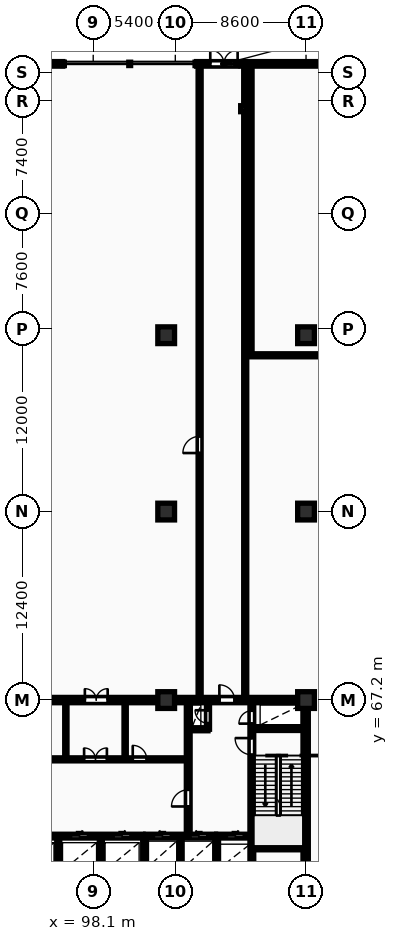
"""IFC4 building model, lengths in metres.
Left out: names, types, materials, properties, quantities, classifications, styles, units other than length and angle.
Written with IfcOpenShell. Run it as: python <this file> out.ifc"""

import sys

from ifc_helpers import new_model, si_unit, direction, frame, frame_2d, origin, origin_2d, place, context, subcontext, project, spatial, rectangle, i_section, extrude, element, fill, save


model = new_model("IFC4")
c1 = context("Model", 3, precision=1e-05, world=origin(), true_north=direction((0.0, 1.0)))
c2 = subcontext(c1, "Body", "Model", "MODEL_VIEW")
j1 = project(units=[si_unit("LENGTHUNIT", "METRE"), si_unit("PLANEANGLEUNIT", "RADIAN")], contexts=[c1])
p1 = place(None, origin())
s1 = spatial("IfcSite", under=j1, at=p1, CompositionType="ELEMENT")
p2 = place(p1, origin())
s2 = spatial("IfcBuilding", under=s1, at=p2, CompositionType="ELEMENT")
p3 = place(p2, origin())
s3 = spatial("IfcBuildingStorey", under=s2, at=p3, CompositionType="ELEMENT", Elevation=0.0)
for number, where, z_axis, x_axis in (
    (1, (102.9, 67.2, 0.0), (0.0, 0.0, 1.0), (1.0, 0.0, 0.0)),
    (2, (102.9, 79.6, 0.0), (0.0, 0.0, 1.0), (1.0, 0.0, 0.0)),
    (3, (102.9, 91.2, 0.0), (0.0, 0.0, 1.0), (1.0, 0.0, 0.0)),
    (4, (112.1, 67.2, 0.0), (0.0, 0.0, 1.0), (1.0, 0.0, 0.0)),
    (5, (112.1, 79.6, 0.0), (0.0, 0.0, 1.0), (1.0, 0.0, 0.0)),
    (6, (112.1, 91.2, 0.0), (0.0, 0.0, 1.0), (1.0, 0.0, 0.0)),
):
    element("IfcColumn", number, at=place(p3, frame(where, z_axis=z_axis, x_axis=x_axis)), inside=s3, PredefinedType="COLUMN", context=c2, shape_type="SweptSolid", body=[
        extrude(rectangle(XDim=1.1, YDim=1.1, at=origin_2d()), origin(), (0.0, 0.0, 1.0), 5.4),
    ])
p4 = place(p3, frame((108.0, 106.1, 0.0), z_axis=(0.0, 0.0, 1.0), x_axis=(1.0, 0.0, 0.0)))
e7 = element("IfcColumn", 7, at=p4, inside=s3, PredefinedType="COLUMN", context=c2, shape_type="SweptSolid", body=[
    extrude(i_section(OverallWidth=0.399, OverallDepth=0.394, WebThickness=0.023, FlangeThickness=0.037, FilletRadius=0.015, at=origin_2d()), origin(), (0.0, 0.0, 1.0), 5.4),
])
p5 = place(p3, frame((153.5, 109.05, 0.0), z_axis=(0.0, 0.0, 1.0), x_axis=(-1.0, 0.0, 0.0)))
e8 = element("IfcWall", 8, at=p5, inside=s3, PredefinedType="STANDARD", context=c2, shape_type="SweptSolid", body=[
    extrude(rectangle(XDim=48.6, YDim=0.3, at=frame_2d((24.3, 0.0))), origin(), (0.0, 0.0, 1.0), 5.1),
])
p6 = place(p5, frame((45.9, 0.0, 0.0)))
e9 = element("IfcOpeningElement", 9, at=p6, cuts=e8, PredefinedType="OPENING", context=c2, shape_type="SweptSolid", body=[
    extrude(rectangle(XDim=1.8, YDim=2.2, at=frame_2d((0.9, 1.1))), frame((0.0, 0.16, 0.0), z_axis=(0.0, -1.0, 0.0), x_axis=(1.0, 0.0, 0.0)), (0.0, 0.0, 1.0), 0.32),
])
p7 = place(p5, frame((12.0, 0.0, 0.9)))
e10 = element("IfcOpeningElement", 10, at=p7, cuts=e8, PredefinedType="OPENING", context=c2, shape_type="SweptSolid", body=[
    extrude(rectangle(XDim=3.0, YDim=2.6, at=frame_2d((1.5, 1.3))), frame((0.0, 0.16, 0.0), z_axis=(0.0, -1.0, 0.0), x_axis=(1.0, 0.0, 0.0)), (0.0, 0.0, 1.0), 0.32),
])
p8 = place(p3, frame((96.1, 109.05, 0.0), z_axis=(0.0, 0.0, 1.0), x_axis=(-1.0, 0.0, 0.0)))
e11 = element("IfcWall", 11, at=p8, inside=s3, PredefinedType="STANDARD", context=c2, shape_type="SweptSolid", body=[
    extrude(rectangle(XDim=4.0, YDim=0.3, at=frame_2d((2.0, 0.0))), origin(), (0.0, 0.0, 1.0), 5.1),
])
p9 = place(p8, frame((1.0, 0.0, 0.0)))
e12 = element("IfcOpeningElement", 12, at=p9, cuts=e11, PredefinedType="OPENING", context=c2, shape_type="SweptSolid", body=[
    extrude(rectangle(XDim=2.0, YDim=2.6, at=frame_2d((1.0, 1.3))), frame((0.0, 0.16, 0.0), z_axis=(0.0, -1.0, 0.0), x_axis=(1.0, 0.0, 0.0)), (0.0, 0.0, 1.0), 0.32),
])
p10 = place(p3, frame((112.075, 55.375, 0.0), z_axis=(0.0, 0.0, 1.0), x_axis=(0.0, 1.0, 0.0)))
e13 = element("IfcWall", 13, at=p10, inside=s3, PredefinedType="SHEAR", context=c2, shape_type="SweptSolid", body=[
    extrude(rectangle(XDim=11.65, YDim=0.35, at=frame_2d((5.825, 0.0))), origin(), (0.0, 0.0, 1.0), 5.4),
])
p11 = place(p3, frame((75.95, 67.2, 0.0), z_axis=(0.0, 0.0, 1.0), x_axis=(1.0, 0.0, 0.0)))
e14 = element("IfcWall", 14, at=p11, inside=s3, PredefinedType="SHEAR", context=c2, shape_type="SweptSolid", body=[
    extrude(rectangle(XDim=36.3, YDim=0.35, at=frame_2d((18.15, 0.0))), origin(), (0.0, 0.0, 1.0), 5.4),
])
p12 = place(p11, frame((5.25, 0.0, 0.0)))
e15 = element("IfcOpeningElement", 15, at=p12, cuts=e14, PredefinedType="OPENING", context=c2, shape_type="SweptSolid", body=[
    extrude(rectangle(XDim=1.0, YDim=2.15, at=frame_2d((0.5, 1.075))), frame((0.0, 0.185, 0.0), z_axis=(0.0, -1.0, 0.0), x_axis=(1.0, 0.0, 0.0)), (0.0, 0.0, 1.0), 0.37),
])
p13 = place(p11, frame((21.6, 0.0, 0.0)))
e16 = element("IfcOpeningElement", 16, at=p13, cuts=e14, PredefinedType="OPENING", context=c2, shape_type="SweptSolid", body=[
    extrude(rectangle(XDim=1.5, YDim=2.2, at=frame_2d((0.75, 1.1))), frame((0.0, 0.185, 0.0), z_axis=(0.0, -1.0, 0.0), x_axis=(1.0, 0.0, 0.0)), (0.0, 0.0, 1.0), 0.37),
])
p14 = place(p11, frame((30.45, 0.0, 0.0)))
e17 = element("IfcOpeningElement", 17, at=p14, cuts=e14, PredefinedType="OPENING", context=c2, shape_type="SweptSolid", body=[
    extrude(rectangle(XDim=1.0, YDim=2.15, at=frame_2d((0.5, 1.075))), frame((0.0, 0.185, 0.0), z_axis=(0.0, -1.0, 0.0), x_axis=(1.0, 0.0, 0.0)), (0.0, 0.0, 1.0), 0.37),
])
for number, where, z_axis, x_axis in (
    (18, (95.8, 55.4, 0.0), (0.0, 0.0, 1.0), (0.0, 1.0, 0.0)),
    (19, (98.6, 55.4, 0.0), (0.0, 0.0, 1.0), (0.0, 1.0, 0.0)),
):
    element("IfcWall", number, at=place(p3, frame(where, z_axis=z_axis, x_axis=x_axis)), inside=s3, PredefinedType="PARTITIONING", context=c2, shape_type="SweptSolid", body=[
        extrude(rectangle(XDim=2.72, YDim=0.2, at=frame_2d((1.36, 0.0))), origin(), (0.0, 0.0, 1.0), 5.1),
    ])
p15 = place(p3, frame((93.02, 58.25, 0.0), z_axis=(0.0, 0.0, 1.0), x_axis=(1.0, 0.0, 0.0)))
e20 = element("IfcWall", 20, at=p15, inside=s3, PredefinedType="SHEAR", context=c2, shape_type="SweptSolid", body=[
    extrude(rectangle(XDim=8.36, YDim=0.25, at=frame_2d((4.18, 0.0))), origin(), (0.0, 0.0, 1.0), 5.4),
])
p16 = place(p15, frame((0.82, 0.0, 0.0)))
e21 = element("IfcOpeningElement", 21, at=p16, cuts=e20, PredefinedType="OPENING", context=c2, shape_type="SweptSolid", body=[
    extrude(rectangle(XDim=1.12, YDim=2.12, at=frame_2d((0.56, 1.06))), frame((0.0, 0.135, 0.0), z_axis=(0.0, -1.0, 0.0), x_axis=(1.0, 0.0, 0.0)), (0.0, 0.0, 1.0), 0.27),
])
p17 = place(p15, frame((3.62, 0.0, 0.0)))
e22 = element("IfcOpeningElement", 22, at=p17, cuts=e20, PredefinedType="OPENING", context=c2, shape_type="SweptSolid", body=[
    extrude(rectangle(XDim=1.12, YDim=2.12, at=frame_2d((0.56, 1.06))), frame((0.0, 0.135, 0.0), z_axis=(0.0, -1.0, 0.0), x_axis=(1.0, 0.0, 0.0)), (0.0, 0.0, 1.0), 0.27),
])
p18 = place(p15, frame((6.42, 0.0, 0.0)))
e23 = element("IfcOpeningElement", 23, at=p18, cuts=e20, PredefinedType="OPENING", context=c2, shape_type="SweptSolid", body=[
    extrude(rectangle(XDim=1.12, YDim=2.12, at=frame_2d((0.56, 1.06))), frame((0.0, 0.135, 0.0), z_axis=(0.0, -1.0, 0.0), x_axis=(1.0, 0.0, 0.0)), (0.0, 0.0, 1.0), 0.27),
])
p19 = place(p3, frame((101.48, 55.4, 0.0), z_axis=(0.0, 0.0, 1.0), x_axis=(0.0, 1.0, 0.0)))
e24 = element("IfcWall", 24, at=p19, inside=s3, PredefinedType="SHEAR", context=c2, shape_type="SweptSolid", body=[
    extrude(rectangle(XDim=2.85, YDim=0.25, at=frame_2d((1.425, 0.0))), origin(), (0.0, 0.0, 1.0), 5.4),
])
p20 = place(p3, frame((103.85, 55.4, 0.0), z_axis=(0.0, 0.0, 1.0), x_axis=(0.0, 1.0, 0.0)))
e25 = element("IfcWall", 25, at=p20, inside=s3, PredefinedType="PARTITIONING", context=c2, shape_type="SweptSolid", body=[
    extrude(rectangle(XDim=2.72, YDim=0.2, at=frame_2d((1.36, 0.0))), origin(), (0.0, 0.0, 1.0), 5.1),
])
p21 = place(p3, frame((101.55, 58.25, 0.0), z_axis=(0.0, 0.0, 1.0), x_axis=(1.0, 0.0, 0.0)))
e26 = element("IfcWall", 26, at=p21, inside=s3, PredefinedType="SHEAR", context=c2, shape_type="SweptSolid", body=[
    extrude(rectangle(XDim=4.6, YDim=0.25, at=frame_2d((2.3, 0.0))), origin(), (0.0, 0.0, 1.0), 5.4),
])
p22 = place(p21, frame((0.54, 0.0, 0.0)))
e27 = element("IfcOpeningElement", 27, at=p22, cuts=e26, PredefinedType="OPENING", context=c2, shape_type="SweptSolid", body=[
    extrude(rectangle(XDim=1.12, YDim=2.12, at=frame_2d((0.56, 1.06))), frame((0.0, 0.135, 0.0), z_axis=(0.0, -1.0, 0.0), x_axis=(1.0, 0.0, 0.0)), (0.0, 0.0, 1.0), 0.27),
])
p23 = place(p21, frame((2.94, 0.0, 0.0)))
e28 = element("IfcOpeningElement", 28, at=p23, cuts=e26, PredefinedType="OPENING", context=c2, shape_type="SweptSolid", body=[
    extrude(rectangle(XDim=1.12, YDim=2.12, at=frame_2d((0.56, 1.06))), frame((0.0, 0.135, 0.0), z_axis=(0.0, -1.0, 0.0), x_axis=(1.0, 0.0, 0.0)), (0.0, 0.0, 1.0), 0.27),
])
p24 = place(p3, frame((106.22, 55.4, 0.0), z_axis=(0.0, 0.0, 1.0), x_axis=(0.0, 1.0, 0.0)))
e29 = element("IfcWall", 29, at=p24, inside=s3, PredefinedType="SHEAR", context=c2, shape_type="SweptSolid", body=[
    extrude(rectangle(XDim=2.85, YDim=0.25, at=frame_2d((1.425, 0.0))), origin(), (0.0, 0.0, 1.0), 5.4),
])
p25 = place(p3, frame((106.22, 58.25, 0.0), z_axis=(0.0, 0.0, 1.0), x_axis=(1.0, 0.0, 0.0)))
e30 = element("IfcWall", 30, at=p25, inside=s3, PredefinedType="SHEAR", context=c2, shape_type="SweptSolid", body=[
    extrude(rectangle(XDim=2.46, YDim=0.25, at=frame_2d((1.23, 0.0))), origin(), (0.0, 0.0, 1.0), 5.4),
])
p26 = place(p25, frame((0.67, 0.0, 0.0)))
e31 = element("IfcOpeningElement", 31, at=p26, cuts=e30, PredefinedType="OPENING", context=c2, shape_type="SweptSolid", body=[
    extrude(rectangle(XDim=1.12, YDim=2.12, at=frame_2d((0.56, 1.06))), frame((0.0, 0.135, 0.0), z_axis=(0.0, -1.0, 0.0), x_axis=(1.0, 0.0, 0.0)), (0.0, 0.0, 1.0), 0.27),
])
for number, where, z_axis, x_axis in (
    (32, (96.3, 63.4, 0.0), (0.0, 0.0, 1.0), (0.0, 1.0, 0.0)),
    (33, (100.2, 63.4, 0.0), (0.0, 0.0, 1.0), (0.0, 1.0, 0.0)),
):
    element("IfcWall", number, at=place(p3, frame(where, z_axis=z_axis, x_axis=x_axis)), inside=s3, PredefinedType="PARTITIONING", context=c2, shape_type="SweptSolid", body=[
        extrude(rectangle(XDim=3.6, YDim=0.15, at=frame_2d((1.8, 0.0))), origin(), (0.0, 0.0, 1.0), 5.1),
    ])
p27 = place(p3, frame((84.42, 63.3, 0.0), z_axis=(0.0, 0.0, 1.0), x_axis=(1.0, 0.0, 0.0)))
e34 = element("IfcWall", 34, at=p27, inside=s3, PredefinedType="PARTITIONING", context=c2, shape_type="SweptSolid", body=[
    extrude(rectangle(XDim=19.83, YDim=0.2, at=frame_2d((9.915, 0.0))), origin(), (0.0, 0.0, 1.0), 5.1),
])
p28 = place(p27, frame((1.15, 0.0, 0.0)))
e35 = element("IfcOpeningElement", 35, at=p28, cuts=e34, PredefinedType="OPENING", context=c2, shape_type="SweptSolid", body=[
    extrude(rectangle(XDim=0.85, YDim=2.05, at=frame_2d((0.425, 1.025))), frame((0.0, 0.11, 0.0), z_axis=(0.0, -1.0, 0.0), x_axis=(1.0, 0.0, 0.0)), (0.0, 0.0, 1.0), 0.22),
])
p29 = place(p27, frame((3.25, 0.0, 0.0)))
e36 = element("IfcOpeningElement", 36, at=p29, cuts=e34, PredefinedType="OPENING", context=c2, shape_type="SweptSolid", body=[
    extrude(rectangle(XDim=0.85, YDim=2.05, at=frame_2d((0.425, 1.025))), frame((0.0, 0.11, 0.0), z_axis=(0.0, -1.0, 0.0), x_axis=(1.0, 0.0, 0.0)), (0.0, 0.0, 1.0), 0.22),
])
p30 = place(p27, frame((13.08, 0.0, 0.0)))
e37 = element("IfcOpeningElement", 37, at=p30, cuts=e34, PredefinedType="OPENING", context=c2, shape_type="SweptSolid", body=[
    extrude(rectangle(XDim=1.5, YDim=2.2, at=frame_2d((0.75, 1.1))), frame((0.0, 0.11, 0.0), z_axis=(0.0, -1.0, 0.0), x_axis=(1.0, 0.0, 0.0)), (0.0, 0.0, 1.0), 0.22),
])
p31 = place(p27, frame((6.78, 0.0, 0.0)))
e38 = element("IfcOpeningElement", 38, at=p31, cuts=e34, PredefinedType="OPENING", context=c2, shape_type="SweptSolid", body=[
    extrude(rectangle(XDim=0.92, YDim=2.08, at=frame_2d((0.46, 1.04))), frame((0.0, 0.11, 0.0), z_axis=(0.0, -1.0, 0.0), x_axis=(1.0, 0.0, 0.0)), (0.0, 0.0, 1.0), 0.22),
])
p32 = place(p27, frame((16.28, 0.0, 0.0)))
e39 = element("IfcOpeningElement", 39, at=p32, cuts=e34, PredefinedType="OPENING", context=c2, shape_type="SweptSolid", body=[
    extrude(rectangle(XDim=0.92, YDim=2.08, at=frame_2d((0.46, 1.04))), frame((0.0, 0.11, 0.0), z_axis=(0.0, -1.0, 0.0), x_axis=(1.0, 0.0, 0.0)), (0.0, 0.0, 1.0), 0.22),
])
p33 = place(p3, frame((104.45, 65.28, 0.0), z_axis=(0.0, 0.0, 1.0), x_axis=(1.0, 0.0, 0.0)))
e40 = element("IfcWall", 40, at=p33, inside=s3, PredefinedType="PARTITIONING", context=c2, shape_type="SweptSolid", body=[
    extrude(rectangle(XDim=1.2, YDim=0.2, at=frame_2d((0.6, 0.0))), origin(), (0.0, 0.0, 1.0), 5.1),
])
p34 = place(p3, frame((105.65, 65.28, 0.0), z_axis=(0.0, 0.0, 1.0), x_axis=(0.0, 1.0, 0.0)))
e41 = element("IfcWall", 41, at=p34, inside=s3, PredefinedType="PARTITIONING", context=c2, shape_type="SweptSolid", body=[
    extrude(rectangle(XDim=1.72, YDim=0.2, at=frame_2d((0.86, 0.0))), origin(), (0.0, 0.0, 1.0), 5.1),
])
p35 = place(p34, frame((0.4, 0.0, 0.0)))
e42 = element("IfcOpeningElement", 42, at=p35, cuts=e41, PredefinedType="OPENING", context=c2, shape_type="SweptSolid", body=[
    extrude(rectangle(XDim=0.85, YDim=2.05, at=frame_2d((0.425, 1.025))), frame((0.0, 0.11, 0.0), z_axis=(0.0, -1.0, 0.0), x_axis=(1.0, 0.0, 0.0)), (0.0, 0.0, 1.0), 0.22),
])
p36 = place(p3, frame((104.35, 58.4, 0.0), z_axis=(0.0, 0.0, 1.0), x_axis=(0.0, 1.0, 0.0)))
e43 = element("IfcWall", 43, at=p36, inside=s3, PredefinedType="SHEAR", context=c2, shape_type="SweptSolid", body=[
    extrude(rectangle(XDim=8.6, YDim=0.25, at=frame_2d((4.3, 0.0))), origin(), (0.0, 0.0, 1.0), 5.4),
])
p37 = place(p36, frame((1.8, 0.0, 0.0)))
e44 = element("IfcOpeningElement", 44, at=p37, cuts=e43, PredefinedType="OPENING", context=c2, shape_type="SweptSolid", body=[
    extrude(rectangle(XDim=1.1, YDim=2.1, at=frame_2d((0.55, 1.05))), frame((0.0, 0.135, 0.0), z_axis=(0.0, -1.0, 0.0), x_axis=(1.0, 0.0, 0.0)), (0.0, 0.0, 1.0), 0.27),
])
p38 = place(p3, frame((108.535, 55.4, 0.0), z_axis=(0.0, 0.0, 1.0), x_axis=(0.0, 1.0, 0.0)))
e45 = element("IfcWall", 45, at=p38, inside=s3, PredefinedType="SHEAR", context=c2, shape_type="SweptSolid", body=[
    extrude(rectangle(XDim=11.6, YDim=0.25, at=frame_2d((5.8, 0.0))), origin(), (0.0, 0.0, 1.0), 5.4),
])
p39 = place(p38, frame((8.2, 0.0, 0.0)))
e46 = element("IfcOpeningElement", 46, at=p39, cuts=e45, PredefinedType="OPENING", context=c2, shape_type="SweptSolid", body=[
    extrude(rectangle(XDim=1.1, YDim=2.1, at=frame_2d((0.55, 1.05))), frame((0.0, 0.135, 0.0), z_axis=(0.0, -1.0, 0.0), x_axis=(1.0, 0.0, 0.0)), (0.0, 0.0, 1.0), 0.27),
])
p40 = place(p38, frame((10.25, 0.0, 0.0)))
e47 = element("IfcOpeningElement", 47, at=p40, cuts=e45, PredefinedType="OPENING", context=c2, shape_type="SweptSolid", body=[
    extrude(rectangle(XDim=0.85, YDim=2.05, at=frame_2d((0.425, 1.025))), frame((0.0, 0.135, 0.0), z_axis=(0.0, -1.0, 0.0), x_axis=(1.0, 0.0, 0.0)), (0.0, 0.0, 1.0), 0.27),
])
for number, where, z_axis, x_axis in (
    (48, (108.66, 57.475, 0.0), (0.0, 0.0, 1.0), (1.0, 0.0, 0.0)),
    (49, (108.66, 65.325, 0.0), (0.0, 0.0, 1.0), (1.0, 0.0, 0.0)),
):
    element("IfcWall", number, at=place(p3, frame(where, z_axis=z_axis, x_axis=x_axis)), inside=s3, PredefinedType="SHEAR", context=c2, shape_type="SweptSolid", body=[
        extrude(rectangle(XDim=3.24, YDim=0.25, at=frame_2d((1.62, 0.0))), origin(), (0.0, 0.0, 1.0), 5.4),
    ])
p41 = place(p3, frame((105.1, 67.45, 0.0), z_axis=(0.0, 0.0, 1.0), x_axis=(0.0, 1.0, 0.0)))
e50 = element("IfcWall", 50, at=p41, inside=s3, PredefinedType="PARTITIONING", context=c2, shape_type="SweptSolid", body=[
    extrude(rectangle(XDim=41.45, YDim=0.2, at=frame_2d((20.725, 0.0))), origin(), (0.0, 0.0, 1.0), 5.1),
])
p42 = place(p41, frame((16.0, 0.0, 0.0)))
e51 = element("IfcOpeningElement", 51, at=p42, cuts=e50, PredefinedType="OPENING", context=c2, shape_type="SweptSolid", body=[
    extrude(rectangle(XDim=1.1, YDim=2.1, at=frame_2d((0.55, 1.05))), frame((0.0, 0.11, 0.0), z_axis=(0.0, -1.0, 0.0), x_axis=(1.0, 0.0, 0.0)), (0.0, 0.0, 1.0), 0.22),
])
p43 = place(p3, frame((108.1, 67.45, 0.0), z_axis=(0.0, 0.0, 1.0), x_axis=(0.0, 1.0, 0.0)))
e52 = element("IfcWall", 52, at=p43, inside=s3, PredefinedType="PARTITIONING", context=c2, shape_type="SweptSolid", body=[
    extrude(rectangle(XDim=41.45, YDim=0.2, at=frame_2d((20.725, 0.0))), origin(), (0.0, 0.0, 1.0), 5.1),
])
p44 = place(p3, frame((108.45, 89.88, 0.0), z_axis=(0.0, 0.0, 1.0), x_axis=(1.0, 0.0, 0.0)))
e53 = element("IfcWall", 53, at=p44, inside=s3, PredefinedType="PARTITIONING", context=c2, shape_type="SweptSolid", body=[
    extrude(rectangle(XDim=22.25, YDim=0.2, at=frame_2d((11.125, 0.0))), origin(), (0.0, 0.0, 1.0), 5.1),
])
p45 = place(p44, frame((8.0, 0.0, 0.0)))
e54 = element("IfcOpeningElement", 54, at=p45, cuts=e53, PredefinedType="OPENING", context=c2, shape_type="SweptSolid", body=[
    extrude(rectangle(XDim=1.22, YDim=2.18, at=frame_2d((0.61, 1.09))), frame((0.0, 0.11, 0.0), z_axis=(0.0, -1.0, 0.0), x_axis=(1.0, 0.0, 0.0)), (0.0, 0.0, 1.0), 0.22),
])
p46 = place(p3, frame((108.45, 89.88, 0.0), z_axis=(0.0, 0.0, 1.0), x_axis=(0.0, 1.0, 0.0)))
e55 = element("IfcWall", 55, at=p46, inside=s3, PredefinedType="PARTITIONING", context=c2, shape_type="SweptSolid", body=[
    extrude(rectangle(XDim=19.07, YDim=0.2, at=frame_2d((9.535, 0.0))), origin(), (0.0, 0.0, 1.0), 5.1),
])
p47 = place(p6, frame((1.8, 0.0, 0.0), z_axis=(0.0, 0.0, 1.0), x_axis=(-1.0, 0.0, 0.0)))
e56 = element("IfcDoor", 56, at=p47, inside=s3, OperationType="DOUBLE_DOOR_SINGLE_SWING", PredefinedType="DOOR", context=c2, shape_type="SweptSolid", body=[
    extrude(rectangle(XDim=1.8, YDim=2.2, at=frame_2d((0.9, 1.1))), frame((0.0, 0.025, 0.0), z_axis=(0.0, -1.0, 0.0), x_axis=(1.0, 0.0, 0.0)), (0.0, 0.0, 1.0), 0.05),
])
fill(e9, e56)
p48 = place(p13, origin())
e57 = element("IfcDoor", 57, at=p48, inside=s3, OperationType="DOUBLE_DOOR_SINGLE_SWING", PredefinedType="DOOR", context=c2, shape_type="SweptSolid", body=[
    extrude(rectangle(XDim=1.5, YDim=2.2, at=frame_2d((0.75, 1.1))), frame((0.0, 0.025, 0.0), z_axis=(0.0, -1.0, 0.0), x_axis=(1.0, 0.0, 0.0)), (0.0, 0.0, 1.0), 0.05),
])
fill(e16, e57)
p49 = place(p14, origin())
e58 = element("IfcDoor", 58, at=p49, inside=s3, OperationType="SINGLE_SWING_LEFT", PredefinedType="DOOR", context=c2, shape_type="SweptSolid", body=[
    extrude(rectangle(XDim=1.0, YDim=2.15, at=frame_2d((0.5, 1.075))), frame((0.0, 0.025, 0.0), z_axis=(0.0, -1.0, 0.0), x_axis=(1.0, 0.0, 0.0)), (0.0, 0.0, 1.0), 0.05),
])
fill(e17, e58)
p50 = place(p17, origin())
e59 = element("IfcDoor", 59, at=p50, inside=s3, OperationType="SLIDING_TO_RIGHT", PredefinedType="DOOR", context=c2, shape_type="SweptSolid", body=[
    extrude(rectangle(XDim=1.12, YDim=2.12, at=frame_2d((0.56, 1.06))), frame((0.0, 0.025, 0.0), z_axis=(0.0, -1.0, 0.0), x_axis=(1.0, 0.0, 0.0)), (0.0, 0.0, 1.0), 0.05),
])
fill(e22, e59)
p51 = place(p18, origin())
e60 = element("IfcDoor", 60, at=p51, inside=s3, OperationType="SLIDING_TO_RIGHT", PredefinedType="DOOR", context=c2, shape_type="SweptSolid", body=[
    extrude(rectangle(XDim=1.12, YDim=2.12, at=frame_2d((0.56, 1.06))), frame((0.0, 0.025, 0.0), z_axis=(0.0, -1.0, 0.0), x_axis=(1.0, 0.0, 0.0)), (0.0, 0.0, 1.0), 0.05),
])
fill(e23, e60)
p52 = place(p22, origin())
e61 = element("IfcDoor", 61, at=p52, inside=s3, OperationType="SLIDING_TO_LEFT", PredefinedType="DOOR", context=c2, shape_type="SweptSolid", body=[
    extrude(rectangle(XDim=1.12, YDim=2.12, at=frame_2d((0.56, 1.06))), frame((0.0, 0.025, 0.0), z_axis=(0.0, -1.0, 0.0), x_axis=(1.0, 0.0, 0.0)), (0.0, 0.0, 1.0), 0.05),
])
fill(e27, e61)
p53 = place(p23, origin())
e62 = element("IfcDoor", 62, at=p53, inside=s3, OperationType="SLIDING_TO_LEFT", PredefinedType="DOOR", context=c2, shape_type="SweptSolid", body=[
    extrude(rectangle(XDim=1.12, YDim=2.12, at=frame_2d((0.56, 1.06))), frame((0.0, 0.025, 0.0), z_axis=(0.0, -1.0, 0.0), x_axis=(1.0, 0.0, 0.0)), (0.0, 0.0, 1.0), 0.05),
])
fill(e28, e62)
p54 = place(p26, origin())
e63 = element("IfcDoor", 63, at=p54, inside=s3, OperationType="SLIDING_TO_RIGHT", PredefinedType="DOOR", context=c2, shape_type="SweptSolid", body=[
    extrude(rectangle(XDim=1.12, YDim=2.12, at=frame_2d((0.56, 1.06))), frame((0.0, 0.025, 0.0), z_axis=(0.0, -1.0, 0.0), x_axis=(1.0, 0.0, 0.0)), (0.0, 0.0, 1.0), 0.05),
])
fill(e31, e63)
p55 = place(p30, origin())
e64 = element("IfcDoor", 64, at=p55, inside=s3, OperationType="DOUBLE_DOOR_SINGLE_SWING", PredefinedType="DOOR", context=c2, shape_type="SweptSolid", body=[
    extrude(rectangle(XDim=1.5, YDim=2.2, at=frame_2d((0.75, 1.1))), frame((0.0, 0.025, 0.0), z_axis=(0.0, -1.0, 0.0), x_axis=(1.0, 0.0, 0.0)), (0.0, 0.0, 1.0), 0.05),
])
fill(e37, e64)
p56 = place(p32, origin())
e65 = element("IfcDoor", 65, at=p56, inside=s3, OperationType="SINGLE_SWING_LEFT", PredefinedType="DOOR", context=c2, shape_type="SweptSolid", body=[
    extrude(rectangle(XDim=0.92, YDim=2.08, at=frame_2d((0.46, 1.04))), frame((0.0, 0.025, 0.0), z_axis=(0.0, -1.0, 0.0), x_axis=(1.0, 0.0, 0.0)), (0.0, 0.0, 1.0), 0.05),
])
fill(e39, e65)
p57 = place(p35, origin())
e66 = element("IfcDoor", 66, at=p57, inside=s3, OperationType="SINGLE_SWING_RIGHT", PredefinedType="DOOR", context=c2, shape_type="SweptSolid", body=[
    extrude(rectangle(XDim=0.85, YDim=2.05, at=frame_2d((0.425, 1.025))), frame((0.0, 0.025, 0.0), z_axis=(0.0, -1.0, 0.0), x_axis=(1.0, 0.0, 0.0)), (0.0, 0.0, 1.0), 0.05),
])
fill(e42, e66)
p58 = place(p37, origin())
e67 = element("IfcDoor", 67, at=p58, inside=s3, OperationType="SINGLE_SWING_LEFT", PredefinedType="DOOR", context=c2, shape_type="SweptSolid", body=[
    extrude(rectangle(XDim=1.1, YDim=2.1, at=frame_2d((0.55, 1.05))), frame((0.0, 0.025, 0.0), z_axis=(0.0, -1.0, 0.0), x_axis=(1.0, 0.0, 0.0)), (0.0, 0.0, 1.0), 0.05),
])
fill(e44, e67)
p59 = place(p39, origin())
e68 = element("IfcDoor", 68, at=p59, inside=s3, OperationType="SINGLE_SWING_RIGHT", PredefinedType="DOOR", context=c2, shape_type="SweptSolid", body=[
    extrude(rectangle(XDim=1.1, YDim=2.1, at=frame_2d((0.55, 1.05))), frame((0.0, 0.025, 0.0), z_axis=(0.0, -1.0, 0.0), x_axis=(1.0, 0.0, 0.0)), (0.0, 0.0, 1.0), 0.05),
])
fill(e46, e68)
p60 = place(p40, origin())
e69 = element("IfcDoor", 69, at=p60, inside=s3, OperationType="SINGLE_SWING_LEFT", PredefinedType="DOOR", context=c2, shape_type="SweptSolid", body=[
    extrude(rectangle(XDim=0.85, YDim=2.05, at=frame_2d((0.425, 1.025))), frame((0.0, 0.025, 0.0), z_axis=(0.0, -1.0, 0.0), x_axis=(1.0, 0.0, 0.0)), (0.0, 0.0, 1.0), 0.05),
])
fill(e47, e69)
p61 = place(p42, origin())
e70 = element("IfcDoor", 70, at=p61, inside=s3, OperationType="SINGLE_SWING_LEFT", PredefinedType="DOOR", context=c2, shape_type="SweptSolid", body=[
    extrude(rectangle(XDim=1.1, YDim=2.1, at=frame_2d((0.55, 1.05))), frame((0.0, 0.025, 0.0), z_axis=(0.0, -1.0, 0.0), x_axis=(1.0, 0.0, 0.0)), (0.0, 0.0, 1.0), 0.05),
])
fill(e51, e70)
save(model, sys.argv[1])
